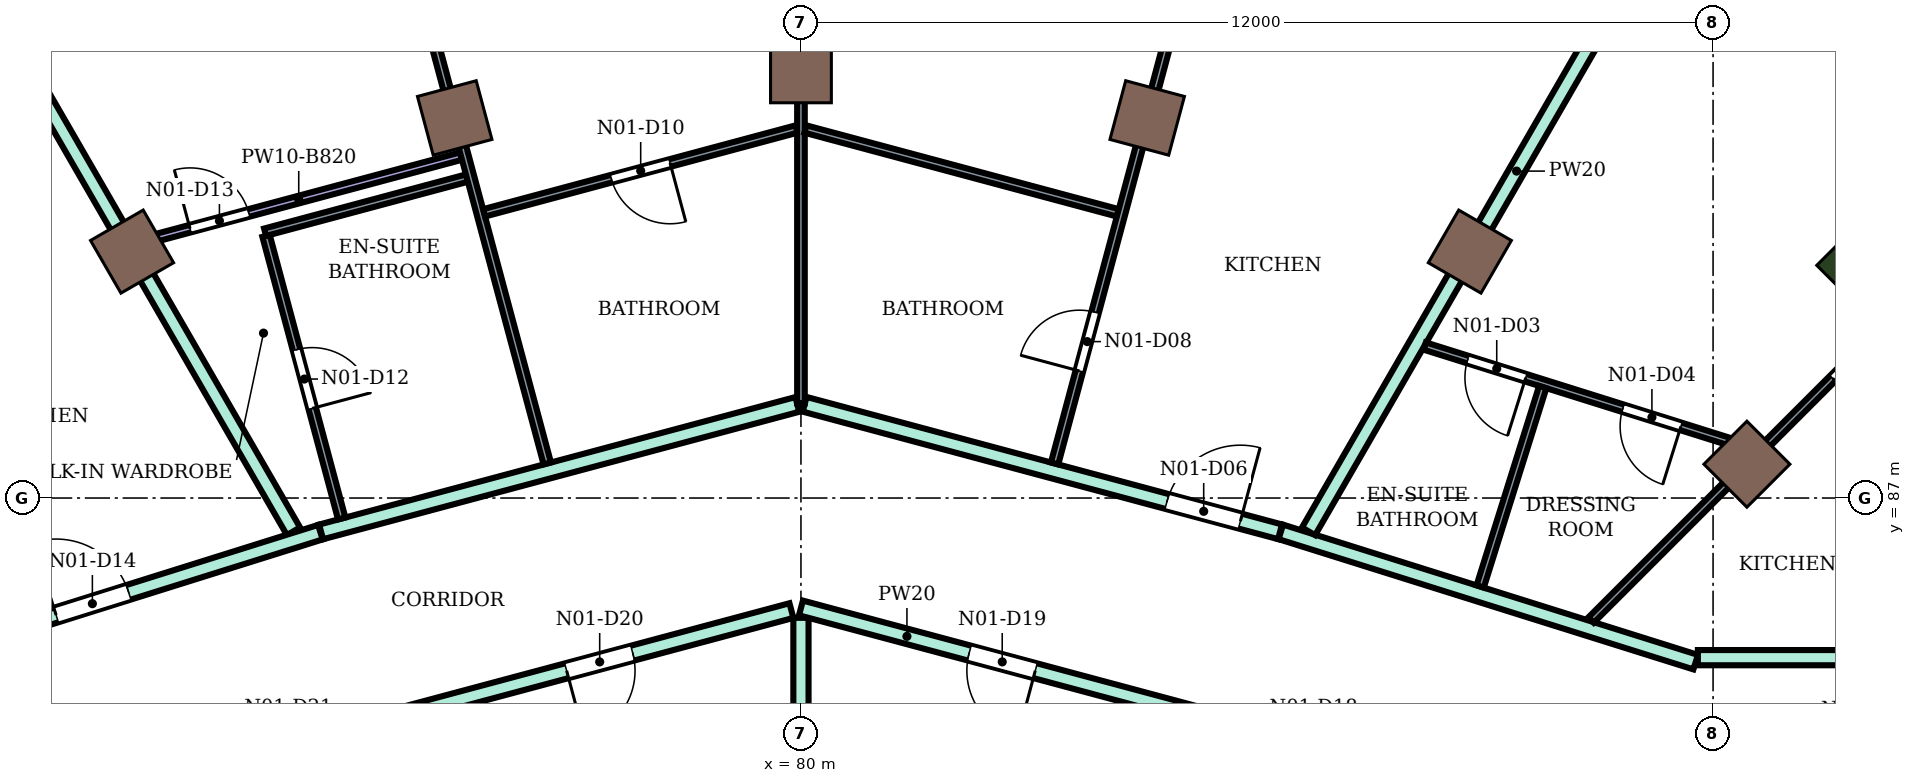
"""IFC4 building model, lengths in metres.
Left out: names, types, materials, properties, quantities, classifications, styles, units other than length and angle.
Written with IfcOpenShell. Run it as: python <this file> out.ifc"""

import sys

from ifc_helpers import new_model, si_unit, direction, frame, frame_2d, origin, origin_2d, place, context, subcontext, project, spatial, rectangle, extrude, element, fill, save


model = new_model("IFC4")
c1 = context("Model", 3, precision=1e-05, world=origin(), true_north=direction((0.0, 1.0)))
c2 = subcontext(c1, "Body", "Model", "MODEL_VIEW")
j1 = project(units=[si_unit("LENGTHUNIT", "METRE"), si_unit("PLANEANGLEUNIT", "RADIAN")], contexts=[c1])
p1 = place(None, origin())
s1 = spatial("IfcSite", under=j1, at=p1, CompositionType="ELEMENT")
p2 = place(p1, origin())
s2 = spatial("IfcBuilding", under=s1, at=p2, CompositionType="ELEMENT")
p3 = place(p2, frame((0.0, 0.0, 279.9)))
s3 = spatial("IfcBuildingStorey", under=s2, at=p3, CompositionType="ELEMENT", Elevation=279.9)
for number, where, z_axis, x_axis in (
    (1, (92.445, 87.445, 0.0), (0.0, 0.0, 1.0), (0.707, 0.707, 0.0)),
    (2, (88.8, 90.242, 0.0), (0.0, 0.0, 1.0), (0.5, 0.866, 0.0)),
    (3, (84.555, 92.0, 0.0), (0.0, 0.0, 1.0), (0.259, 0.966, 0.0)),
    (4, (80.0, 92.6, 0.0), (0.0, 0.0, 1.0), (0.0, 1.0, 0.0)),
    (5, (75.445, 92.0, 0.0), (0.0, 0.0, 1.0), (-0.259, 0.966, 0.0)),
    (6, (71.2, 90.242, 0.0), (0.0, 0.0, 1.0), (-0.5, 0.866, 0.0)),
):
    element("IfcColumn", number, at=place(p3, frame(where, z_axis=z_axis, x_axis=x_axis)), inside=s3, PredefinedType="COLUMN", context=c2, shape_type="SweptSolid", body=[
        extrude(rectangle(XDim=0.8, YDim=0.8, at=origin_2d()), origin(), (0.0, 0.0, 1.0), 4.2),
    ])
p4 = place(p3, frame((94.849, 89.849, 0.0), z_axis=(0.0, 0.0, 1.0), x_axis=(0.707106781187, 0.707106781187, 0.0)))
e7 = element("IfcColumn", 7, at=p4, inside=s3, PredefinedType="COLUMN", context=c2, shape_type="SweptSolid", body=[
    extrude(rectangle(XDim=1.8, YDim=2.4, at=origin_2d()), origin(), (0.0, 0.0, 1.0), 4.2),
])
p5 = place(p3, frame((67.852, 96.042, 0.0), z_axis=(0.0, 0.0, 1.0), x_axis=(0.499960582802, -0.866048160118, 0.0)))
e8 = element("IfcWall", 8, at=p5, inside=s3, PredefinedType="PARTITIONING", context=c2, shape_type="SweptSolid", body=[
    extrude(rectangle(XDim=10.946, YDim=0.2, at=frame_2d((5.473, 0.0))), origin(), (0.0, 0.0, 1.0), 3.75),
])
p6 = place(p3, frame((68.2, 84.833, 0.0), z_axis=(0.0, 0.0, 1.0), x_axis=(0.954191968402, 0.299195065863, 0.0)))
e9 = element("IfcWall", 9, at=p6, inside=s3, PredefinedType="PARTITIONING", context=c2, shape_type="SweptSolid", body=[
    extrude(rectangle(XDim=5.74, YDim=0.2, at=frame_2d((2.87, 0.0))), origin(), (0.0, 0.0, 1.0), 3.75),
])
p7 = place(p6, frame((2.097, 0.0, 0.0)))
e10 = element("IfcOpeningElement", 10, at=p7, cuts=e9, PredefinedType="OPENING", context=c2, shape_type="SweptSolid", body=[
    extrude(rectangle(XDim=1.0, YDim=2.1, at=frame_2d((0.5, 1.05))), frame((0.0, 0.11, 0.0), z_axis=(0.0, -1.0, 0.0), x_axis=(1.0, 0.0, 0.0)), (0.0, 0.0, 1.0), 0.22),
])
p8 = place(p3, frame((73.687, 86.554, 0.0), z_axis=(0.0, 0.0, 1.0), x_axis=(0.966002126521, 0.258534120682, 0.0)))
e11 = element("IfcWall", 11, at=p8, inside=s3, PredefinedType="PARTITIONING", context=c2, shape_type="SweptSolid", body=[
    extrude(rectangle(XDim=6.486, YDim=0.2, at=frame_2d((3.243, 0.0))), origin(), (0.0, 0.0, 1.0), 3.75),
])
p9 = place(p3, frame((74.413, 84.057, 0.0), z_axis=(0.0, 0.0, 1.0), x_axis=(0.965972135939, 0.258646153246, 0.0)))
e12 = element("IfcWall", 12, at=p9, inside=s3, PredefinedType="PARTITIONING", context=c2, shape_type="SweptSolid", body=[
    extrude(rectangle(XDim=5.654, YDim=0.2, at=frame_2d((2.827, 0.0))), origin(), (0.0, 0.0, 1.0), 3.75),
])
p10 = place(p9, frame((2.593, 0.0, 0.0)))
e13 = element("IfcOpeningElement", 13, at=p10, cuts=e12, PredefinedType="OPENING", context=c2, shape_type="SweptSolid", body=[
    extrude(rectangle(XDim=0.9, YDim=2.1, at=frame_2d((0.45, 1.05))), frame((0.0, 0.11, 0.0), z_axis=(0.0, -1.0, 0.0), x_axis=(1.0, 0.0, 0.0)), (0.0, 0.0, 1.0), 0.22),
])
p11 = place(p3, frame((80.0, 82.699, 0.0), z_axis=(0.0, 0.0, 1.0), x_axis=(0.0, 1.0, 0.0)))
e14 = element("IfcWall", 14, at=p11, inside=s3, PredefinedType="PARTITIONING", context=c2, shape_type="SweptSolid", body=[
    extrude(rectangle(XDim=2.725, YDim=0.2, at=frame_2d((1.363, 0.0))), origin(), (0.0, 0.0, 1.0), 3.75),
])
p12 = place(p3, frame((80.0, 85.554, 0.0), z_axis=(0.0, 0.0, 1.0), x_axis=(0.965928989968, -0.258807237802, 0.0)))
e15 = element("IfcWall", 15, at=p12, inside=s3, PredefinedType="PARTITIONING", context=c2, shape_type="SweptSolid", body=[
    extrude(rectangle(XDim=5.774, YDim=0.2, at=frame_2d((2.887, 0.0))), origin(), (0.0, 0.0, 1.0), 3.75),
])
p13 = place(p12, frame((2.292, 0.0, 0.0)))
e16 = element("IfcOpeningElement", 16, at=p13, cuts=e15, PredefinedType="OPENING", context=c2, shape_type="SweptSolid", body=[
    extrude(rectangle(XDim=0.9, YDim=2.1, at=frame_2d((0.45, 1.05))), frame((0.0, 0.11, 0.0), z_axis=(0.0, -1.0, 0.0), x_axis=(1.0, 0.0, 0.0)), (0.0, 0.0, 1.0), 0.22),
])
p14 = place(p3, frame((80.048, 88.233, 0.0), z_axis=(0.0, 0.0, 1.0), x_axis=(0.965865387308, -0.259044501198, 0.0)))
e17 = element("IfcWall", 17, at=p14, inside=s3, PredefinedType="PARTITIONING", context=c2, shape_type="SweptSolid", body=[
    extrude(rectangle(XDim=6.476, YDim=0.2, at=frame_2d((3.238, 0.0))), origin(), (0.0, 0.0, 1.0), 3.75),
])
p15 = place(p14, frame((4.936, 0.0, 0.0)))
e18 = element("IfcOpeningElement", 18, at=p15, cuts=e17, PredefinedType="OPENING", context=c2, shape_type="SweptSolid", body=[
    extrude(rectangle(XDim=1.0, YDim=2.1, at=frame_2d((0.5, 1.05))), frame((0.0, 0.11, 0.0), z_axis=(0.0, -1.0, 0.0), x_axis=(1.0, 0.0, 0.0)), (0.0, 0.0, 1.0), 0.22),
])
p16 = place(p3, frame((86.313, 86.554, 0.0), z_axis=(0.0, 0.0, 1.0), x_axis=(0.954089584911, -0.299521391497, 0.0)))
e19 = element("IfcWall", 19, at=p16, inside=s3, PredefinedType="PARTITIONING", context=c2, shape_type="SweptSolid", body=[
    extrude(rectangle(XDim=5.72, YDim=0.2, at=frame_2d((2.86, 0.0))), origin(), (0.0, 0.0, 1.0), 3.75),
])
p17 = place(p3, frame((86.678, 86.562, 0.0), z_axis=(0.0, 0.0, 1.0), x_axis=(0.500133037155, 0.865948581122, 0.0)))
e20 = element("IfcWall", 20, at=p17, inside=s3, PredefinedType="PARTITIONING", context=c2, shape_type="SweptSolid", body=[
    extrude(rectangle(XDim=10.946, YDim=0.2, at=frame_2d((5.473, 0.0))), origin(), (0.0, 0.0, 1.0), 3.75),
])
p18 = place(p3, frame((91.8, 84.9, 0.0), z_axis=(0.0, 0.0, 1.0), x_axis=(1.0, 0.0, 0.0)))
e21 = element("IfcWall", 21, at=p18, inside=s3, PredefinedType="PARTITIONING", context=c2, shape_type="SweptSolid", body=[
    extrude(rectangle(XDim=2.9, YDim=0.2, at=frame_2d((1.45, 0.0))), origin(), (0.0, 0.0, 1.0), 3.75),
])
p19 = place(p3, frame((71.258, 90.354, 0.0), z_axis=(0.0, 0.0, 1.0), x_axis=(0.965955692548, 0.258707556973, 0.0)))
e22 = element("IfcWall", 22, at=p19, inside=s3, PredefinedType="PARTITIONING", context=c2, shape_type="SweptSolid", body=[
    extrude(rectangle(XDim=4.42, YDim=0.1, at=frame_2d((2.21, 0.0))), origin(), (0.0, 0.0, 1.0), 3.38),
])
p20 = place(p19, frame((0.73, 0.0, 0.0)))
e23 = element("IfcOpeningElement", 23, at=p20, cuts=e22, PredefinedType="OPENING", context=c2, shape_type="SweptSolid", body=[
    extrude(rectangle(XDim=0.8, YDim=2.1, at=frame_2d((0.4, 1.05))), frame((0.0, 0.06, 0.0), z_axis=(0.0, -1.0, 0.0), x_axis=(1.0, 0.0, 0.0)), (0.0, 0.0, 1.0), 0.12),
])
p21 = place(p3, frame((72.963, 90.449, 0.0), z_axis=(0.0, 0.0, 1.0), x_axis=(0.25854689918, -0.965998706482, 0.0)))
e24 = element("IfcWall", 24, at=p21, inside=s3, PredefinedType="PARTITIONING", context=c2, shape_type="SweptSolid", body=[
    extrude(rectangle(XDim=3.849, YDim=0.1, at=frame_2d((1.924, 0.0))), origin(), (0.0, 0.0, 1.0), 3.75),
])
p22 = place(p21, frame((1.55, 0.0, 0.0)))
e25 = element("IfcOpeningElement", 25, at=p22, cuts=e24, PredefinedType="OPENING", context=c2, shape_type="SweptSolid", body=[
    extrude(rectangle(XDim=0.8, YDim=2.1, at=frame_2d((0.4, 1.05))), frame((0.0, 0.06, 0.0), z_axis=(0.0, -1.0, 0.0), x_axis=(1.0, 0.0, 0.0)), (0.0, 0.0, 1.0), 0.12),
])
p23 = place(p3, frame((72.95, 90.497, 0.0), z_axis=(0.0, 0.0, 1.0), x_axis=(0.96588619323, 0.258966912418, 0.0)))
e26 = element("IfcWall", 26, at=p23, inside=s3, PredefinedType="PARTITIONING", context=c2, shape_type="SweptSolid", body=[
    extrude(rectangle(XDim=2.749, YDim=0.1, at=frame_2d((1.375, 0.0))), origin(), (0.0, 0.0, 1.0), 3.75),
])
p24 = place(p3, frame((73.712, 98.47, 0.0), z_axis=(0.0, 0.0, 1.0), x_axis=(0.258727167471, -0.965950440143, 0.0)))
e27 = element("IfcWall", 27, at=p24, inside=s3, PredefinedType="PARTITIONING", context=c2, shape_type="SweptSolid", body=[
    extrude(rectangle(XDim=11.404, YDim=0.1, at=frame_2d((5.702, 0.0))), origin(), (0.0, 0.0, 1.0), 3.75),
])
p25 = place(p24, frame((3.187, 0.0, 0.0)))
e28 = element("IfcOpeningElement", 28, at=p25, cuts=e27, PredefinedType="OPENING", context=c2, shape_type="SweptSolid", body=[
    extrude(rectangle(XDim=0.9, YDim=2.1, at=frame_2d((0.45, 1.05))), frame((0.0, 0.06, 0.0), z_axis=(0.0, -1.0, 0.0), x_axis=(1.0, 0.0, 0.0)), (0.0, 0.0, 1.0), 0.12),
])
p26 = place(p3, frame((75.832, 90.752, 0.0), z_axis=(0.0, 0.0, 1.0), x_axis=(0.965856843682, 0.259076354601, 0.0)))
e29 = element("IfcWall", 29, at=p26, inside=s3, PredefinedType="PARTITIONING", context=c2, shape_type="SweptSolid", body=[
    extrude(rectangle(XDim=4.256, YDim=0.1, at=frame_2d((2.128, 0.0))), origin(), (0.0, 0.0, 1.0), 3.75),
])
p27 = place(p26, frame((1.733, 0.0, 0.0)))
e30 = element("IfcOpeningElement", 30, at=p27, cuts=e29, PredefinedType="OPENING", context=c2, shape_type="SweptSolid", body=[
    extrude(rectangle(XDim=0.8, YDim=2.1, at=frame_2d((0.4, 1.05))), frame((0.0, 0.06, 0.0), z_axis=(0.0, -1.0, 0.0), x_axis=(1.0, 0.0, 0.0)), (0.0, 0.0, 1.0), 0.12),
])
p28 = place(p3, frame((80.0, 88.246, 0.0), z_axis=(0.0, 0.0, 1.0), x_axis=(0.0, 1.0, 0.0)))
e31 = element("IfcWall", 31, at=p28, inside=s3, PredefinedType="PARTITIONING", context=c2, shape_type="SweptSolid", body=[
    extrude(rectangle(XDim=8.454, YDim=0.1, at=frame_2d((4.227, 0.0))), origin(), (0.0, 0.0, 1.0), 3.75),
])
p29 = place(p28, frame((5.564, 0.0, 0.0)))
e32 = element("IfcOpeningElement", 32, at=p29, cuts=e31, PredefinedType="OPENING", context=c2, shape_type="SweptSolid", body=[
    extrude(rectangle(XDim=0.9, YDim=2.1, at=frame_2d((0.45, 1.05))), frame((0.0, 0.06, 0.0), z_axis=(0.0, -1.0, 0.0), x_axis=(1.0, 0.0, 0.0)), (0.0, 0.0, 1.0), 0.12),
])
p30 = place(p3, frame((80.058, 91.854, 0.0), z_axis=(0.0, 0.0, 1.0), x_axis=(0.96586069397, -0.259061999998, 0.0)))
e33 = element("IfcWall", 33, at=p30, inside=s3, PredefinedType="PARTITIONING", context=c2, shape_type="SweptSolid", body=[
    extrude(rectangle(XDim=4.256, YDim=0.1, at=frame_2d((2.128, 0.0))), origin(), (0.0, 0.0, 1.0), 3.75),
])
p31 = place(p3, frame((83.337, 87.455, 0.0), z_axis=(0.0, 0.0, 1.0), x_axis=(0.25887234328, 0.965911543509, 0.0)))
e34 = element("IfcWall", 34, at=p31, inside=s3, PredefinedType="PARTITIONING", context=c2, shape_type="SweptSolid", body=[
    extrude(rectangle(XDim=11.404, YDim=0.1, at=frame_2d((5.702, 0.0))), origin(), (0.0, 0.0, 1.0), 3.75),
])
p32 = place(p31, frame((7.326, 0.0, 0.0)))
e35 = element("IfcOpeningElement", 35, at=p32, cuts=e34, PredefinedType="OPENING", context=c2, shape_type="SweptSolid", body=[
    extrude(rectangle(XDim=0.9, YDim=2.1, at=frame_2d((0.45, 1.05))), frame((0.0, 0.06, 0.0), z_axis=(0.0, -1.0, 0.0), x_axis=(1.0, 0.0, 0.0)), (0.0, 0.0, 1.0), 0.12),
])
p33 = place(p31, frame((1.26, 0.0, 0.0)))
e36 = element("IfcOpeningElement", 36, at=p33, cuts=e34, PredefinedType="OPENING", context=c2, shape_type="SweptSolid", body=[
    extrude(rectangle(XDim=0.8, YDim=2.1, at=frame_2d((0.4, 1.05))), frame((0.0, 0.06, 0.0), z_axis=(0.0, -1.0, 0.0), x_axis=(1.0, 0.0, 0.0)), (0.0, 0.0, 1.0), 0.12),
])
p34 = place(p3, frame((88.207, 88.999, 0.0), z_axis=(0.0, 0.0, 1.0), x_axis=(0.954166656768, -0.29927577769, 0.0)))
e37 = element("IfcWall", 37, at=p34, inside=s3, PredefinedType="PARTITIONING", context=c2, shape_type="SweptSolid", body=[
    extrude(rectangle(XDim=4.542, YDim=0.1, at=frame_2d((2.271, 0.0))), origin(), (0.0, 0.0, 1.0), 3.75),
])
p35 = place(p34, frame((0.592, 0.0, 0.0)))
e38 = element("IfcOpeningElement", 38, at=p35, cuts=e37, PredefinedType="OPENING", context=c2, shape_type="SweptSolid", body=[
    extrude(rectangle(XDim=0.8, YDim=2.1, at=frame_2d((0.4, 1.05))), frame((0.0, 0.06, 0.0), z_axis=(0.0, -1.0, 0.0), x_axis=(1.0, 0.0, 0.0)), (0.0, 0.0, 1.0), 0.12),
])
p36 = place(p34, frame((2.732, 0.0, 0.0)))
e39 = element("IfcOpeningElement", 39, at=p36, cuts=e37, PredefinedType="OPENING", context=c2, shape_type="SweptSolid", body=[
    extrude(rectangle(XDim=0.8, YDim=2.1, at=frame_2d((0.4, 1.05))), frame((0.0, 0.06, 0.0), z_axis=(0.0, -1.0, 0.0), x_axis=(1.0, 0.0, 0.0)), (0.0, 0.0, 1.0), 0.12),
])
p37 = place(p3, frame((88.936, 85.836, 0.0), z_axis=(0.0, 0.0, 1.0), x_axis=(0.299371771011, 0.954136543018, 0.0)))
e40 = element("IfcWall", 40, at=p37, inside=s3, PredefinedType="PARTITIONING", context=c2, shape_type="SweptSolid", body=[
    extrude(rectangle(XDim=2.75, YDim=0.1, at=frame_2d((1.375, 0.0))), origin(), (0.0, 0.0, 1.0), 3.75),
])
p38 = place(p3, frame((90.395, 85.395, 0.0), z_axis=(0.0, 0.0, 1.0), x_axis=(0.707106781187, 0.707106781187, 0.0)))
e41 = element("IfcWall", 41, at=p38, inside=s3, PredefinedType="PARTITIONING", context=c2, shape_type="SweptSolid", body=[
    extrude(rectangle(XDim=7.0, YDim=0.1, at=frame_2d((3.5, 0.0))), origin(), (0.0, 0.0, 1.0), 3.75),
])
p39 = place(p38, frame((4.496, 0.0, 0.0)))
e42 = element("IfcOpeningElement", 42, at=p39, cuts=e41, PredefinedType="OPENING", context=c2, shape_type="SweptSolid", body=[
    extrude(rectangle(XDim=0.9, YDim=2.1, at=frame_2d((0.45, 1.05))), frame((0.0, 0.06, 0.0), z_axis=(0.0, -1.0, 0.0), x_axis=(1.0, 0.0, 0.0)), (0.0, 0.0, 1.0), 0.12),
])
p40 = place(p39, frame((0.9, 0.0, 0.0), z_axis=(0.0, 0.0, 1.0), x_axis=(-1.0, 0.0, 0.0)))
e43 = element("IfcDoor", 43, at=p40, inside=s3, OperationType="SINGLE_SWING_RIGHT", PredefinedType="DOOR", context=c2, shape_type="SweptSolid", body=[
    extrude(rectangle(XDim=0.9, YDim=2.1, at=frame_2d((0.45, 1.05))), frame((0.0, 0.025, 0.0), z_axis=(0.0, -1.0, 0.0), x_axis=(1.0, 0.0, 0.0)), (0.0, 0.0, 1.0), 0.05),
])
fill(e42, e43)
p41 = place(p35, frame((0.8, 0.0, 0.0), z_axis=(0.0, 0.0, 1.0), x_axis=(-1.0, 0.0, 0.0)))
e44 = element("IfcDoor", 44, at=p41, inside=s3, OperationType="SINGLE_SWING_LEFT", PredefinedType="DOOR", context=c2, shape_type="SweptSolid", body=[
    extrude(rectangle(XDim=0.8, YDim=2.1, at=frame_2d((0.4, 1.05))), frame((0.0, 0.025, 0.0), z_axis=(0.0, -1.0, 0.0), x_axis=(1.0, 0.0, 0.0)), (0.0, 0.0, 1.0), 0.05),
])
fill(e38, e44)
p42 = place(p36, frame((0.8, 0.0, 0.0), z_axis=(0.0, 0.0, 1.0), x_axis=(-1.0, 0.0, 0.0)))
e45 = element("IfcDoor", 45, at=p42, inside=s3, OperationType="SINGLE_SWING_LEFT", PredefinedType="DOOR", context=c2, shape_type="SweptSolid", body=[
    extrude(rectangle(XDim=0.8, YDim=2.1, at=frame_2d((0.4, 1.05))), frame((0.0, 0.025, 0.0), z_axis=(0.0, -1.0, 0.0), x_axis=(1.0, 0.0, 0.0)), (0.0, 0.0, 1.0), 0.05),
])
fill(e39, e45)
p43 = place(p15, origin())
e46 = element("IfcDoor", 46, at=p43, inside=s3, OperationType="SINGLE_SWING_RIGHT", PredefinedType="DOOR", context=c2, shape_type="SweptSolid", body=[
    extrude(rectangle(XDim=1.0, YDim=2.1, at=frame_2d((0.5, 1.05))), frame((0.0, 0.025, 0.0), z_axis=(0.0, -1.0, 0.0), x_axis=(1.0, 0.0, 0.0)), (0.0, 0.0, 1.0), 0.05),
])
fill(e18, e46)
p44 = place(p33, origin())
e47 = element("IfcDoor", 47, at=p44, inside=s3, OperationType="SINGLE_SWING_LEFT", PredefinedType="DOOR", context=c2, shape_type="SweptSolid", body=[
    extrude(rectangle(XDim=0.8, YDim=2.1, at=frame_2d((0.4, 1.05))), frame((0.0, 0.025, 0.0), z_axis=(0.0, -1.0, 0.0), x_axis=(1.0, 0.0, 0.0)), (0.0, 0.0, 1.0), 0.05),
])
fill(e36, e47)
p45 = place(p27, frame((0.8, 0.0, 0.0), z_axis=(0.0, 0.0, 1.0), x_axis=(-1.0, 0.0, 0.0)))
e48 = element("IfcDoor", 48, at=p45, inside=s3, OperationType="SINGLE_SWING_LEFT", PredefinedType="DOOR", context=c2, shape_type="SweptSolid", body=[
    extrude(rectangle(XDim=0.8, YDim=2.1, at=frame_2d((0.4, 1.05))), frame((0.0, 0.025, 0.0), z_axis=(0.0, -1.0, 0.0), x_axis=(1.0, 0.0, 0.0)), (0.0, 0.0, 1.0), 0.05),
])
fill(e30, e48)
p46 = place(p22, origin())
e49 = element("IfcDoor", 49, at=p46, inside=s3, OperationType="SINGLE_SWING_RIGHT", PredefinedType="DOOR", context=c2, shape_type="SweptSolid", body=[
    extrude(rectangle(XDim=0.8, YDim=2.1, at=frame_2d((0.4, 1.05))), frame((0.0, 0.025, 0.0), z_axis=(0.0, -1.0, 0.0), x_axis=(1.0, 0.0, 0.0)), (0.0, 0.0, 1.0), 0.05),
])
fill(e25, e49)
p47 = place(p20, origin())
e50 = element("IfcDoor", 50, at=p47, inside=s3, OperationType="SINGLE_SWING_LEFT", PredefinedType="DOOR", context=c2, shape_type="SweptSolid", body=[
    extrude(rectangle(XDim=0.8, YDim=2.1, at=frame_2d((0.4, 1.05))), frame((0.0, 0.025, 0.0), z_axis=(0.0, -1.0, 0.0), x_axis=(1.0, 0.0, 0.0)), (0.0, 0.0, 1.0), 0.05),
])
fill(e23, e50)
p48 = place(p7, origin())
e51 = element("IfcDoor", 51, at=p48, inside=s3, OperationType="SINGLE_SWING_LEFT", PredefinedType="DOOR", context=c2, shape_type="SweptSolid", body=[
    extrude(rectangle(XDim=1.0, YDim=2.1, at=frame_2d((0.5, 1.05))), frame((0.0, 0.025, 0.0), z_axis=(0.0, -1.0, 0.0), x_axis=(1.0, 0.0, 0.0)), (0.0, 0.0, 1.0), 0.05),
])
fill(e10, e51)
p49 = place(p13, frame((0.9, 0.0, 0.0), z_axis=(0.0, 0.0, 1.0), x_axis=(-1.0, 0.0, 0.0)))
e52 = element("IfcDoor", 52, at=p49, inside=s3, OperationType="SINGLE_SWING_LEFT", PredefinedType="DOOR", context=c2, shape_type="SweptSolid", body=[
    extrude(rectangle(XDim=0.9, YDim=2.1, at=frame_2d((0.45, 1.05))), frame((0.0, 0.025, 0.0), z_axis=(0.0, -1.0, 0.0), x_axis=(1.0, 0.0, 0.0)), (0.0, 0.0, 1.0), 0.05),
])
fill(e16, e52)
p50 = place(p10, frame((0.9, 0.0, 0.0), z_axis=(0.0, 0.0, 1.0), x_axis=(-1.0, 0.0, 0.0)))
e53 = element("IfcDoor", 53, at=p50, inside=s3, OperationType="SINGLE_SWING_RIGHT", PredefinedType="DOOR", context=c2, shape_type="SweptSolid", body=[
    extrude(rectangle(XDim=0.9, YDim=2.1, at=frame_2d((0.45, 1.05))), frame((0.0, 0.025, 0.0), z_axis=(0.0, -1.0, 0.0), x_axis=(1.0, 0.0, 0.0)), (0.0, 0.0, 1.0), 0.05),
])
fill(e13, e53)
save(model, sys.argv[1])
